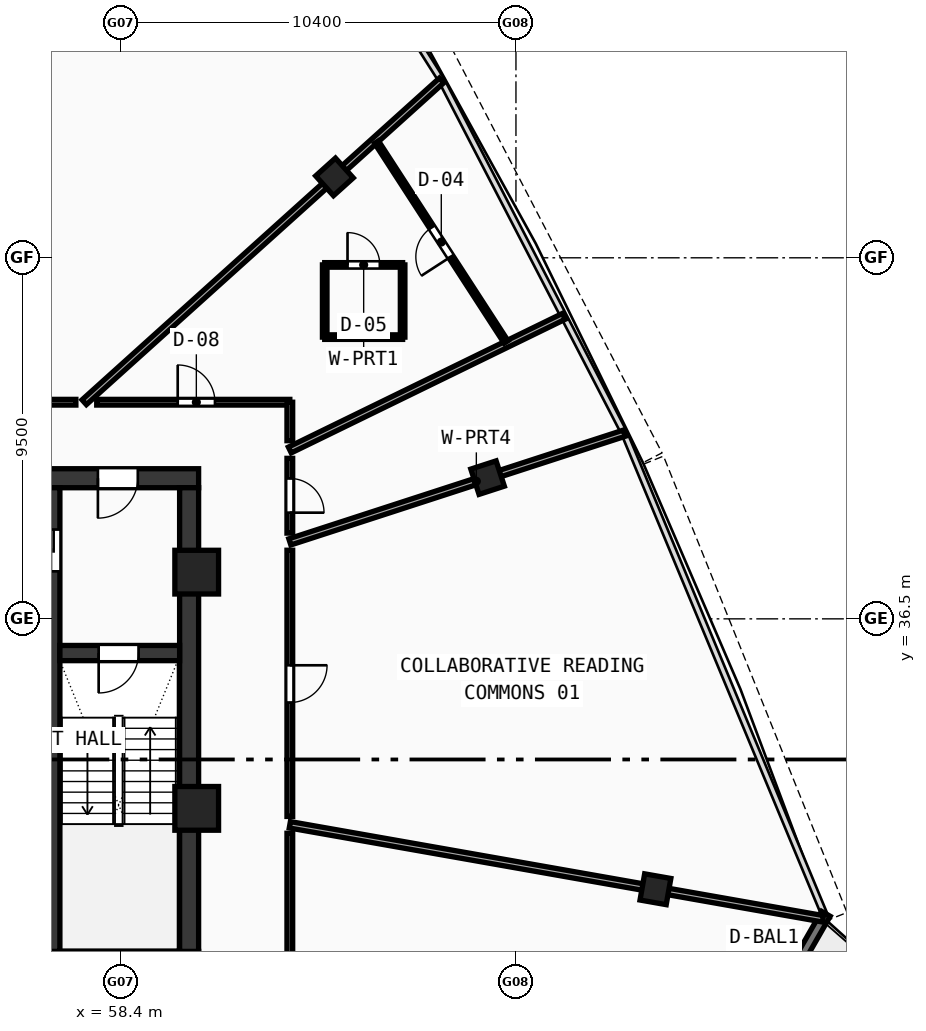
"""IFC4 building model, lengths in metres.
Left out: names, types, materials, properties, quantities, classifications, styles, units other than length and angle.
Written with IfcOpenShell. Run it as: python <this file> out.ifc"""

import sys

from ifc_helpers import new_model, si_unit, direction, frame, frame_2d, origin, origin_with_axes, origin_2d, place, context, subcontext, project, spatial, rectangle, hollow_rectangle, extrude, source, transform, mapped, element, fill, save


model = new_model("IFC4")
c1 = context("Model", 3, precision=1e-05, world=origin(), true_north=direction((0.0, 1.0)))
c2 = subcontext(c1, "Body", "Model", "MODEL_VIEW")
j1 = project(units=[si_unit("LENGTHUNIT", "METRE"), si_unit("PLANEANGLEUNIT", "RADIAN")], contexts=[c1])
p1 = place(None, origin())
s1 = spatial("IfcSite", under=j1, at=p1, CompositionType="ELEMENT")
p2 = place(p1, origin())
s2 = spatial("IfcBuilding", under=s1, at=p2, CompositionType="ELEMENT")
p3 = place(p2, frame((0.0, 0.0, 325.51)))
s3 = spatial("IfcBuildingStorey", under=s2, at=p3, CompositionType="ELEMENT", Elevation=325.51)
p4 = place(p3, frame((35.55, 27.5, 0.0), z_axis=(0.0, 0.0, 1.0), x_axis=(1.0, 0.0, 0.0)))
e1 = element("IfcWall", 1, at=p4, inside=s3, PredefinedType="SHEAR", context=c2, shape_type="SweptSolid", body=[
    extrude(rectangle(XDim=24.9, YDim=0.5, at=frame_2d((12.45, 0.0))), origin(), (0.0, 0.0, 1.0), 3.49),
])
p5 = place(p3, frame((49.2, 40.2, 0.0), z_axis=(0.0, 0.0, 1.0), x_axis=(1.0, 0.0, 0.0)))
e2 = element("IfcWall", 2, at=p5, inside=s3, PredefinedType="SHEAR", context=c2, shape_type="SweptSolid", body=[
    extrude(rectangle(XDim=11.25, YDim=0.5, at=frame_2d((5.625, 0.0))), origin(), (0.0, 0.0, 1.0), 3.49),
])
p6 = place(p5, frame((8.6, 0.0, 0.0)))
e3 = element("IfcOpeningElement", 3, at=p6, cuts=e2, PredefinedType="OPENING", context=c2, shape_type="SweptSolid", body=[
    extrude(rectangle(XDim=1.05, YDim=2.1, at=frame_2d((0.525, 1.05))), frame((0.0, 0.26, 0.0), z_axis=(0.0, -1.0, 0.0), x_axis=(1.0, 0.0, 0.0)), (0.0, 0.0, 1.0), 0.52),
])
p7 = place(p3, frame((60.2, 27.75, 0.0), z_axis=(0.0, 0.0, 1.0), x_axis=(0.0, 1.0, 0.0)))
e4 = element("IfcWall", 4, at=p7, inside=s3, PredefinedType="SHEAR", context=c2, shape_type="SweptSolid", body=[
    extrude(rectangle(XDim=12.2, YDim=0.5, at=frame_2d((6.1, 0.0))), origin(), (0.0, 0.0, 1.0), 3.49),
])
p8 = place(p3, frame((56.6, 27.75, 0.0), z_axis=(0.0, 0.0, 1.0), x_axis=(0.0, 1.0, 0.0)))
e5 = element("IfcWall", 5, at=p8, inside=s3, PredefinedType="SHEAR", context=c2, shape_type="SweptSolid", body=[
    extrude(rectangle(XDim=12.2, YDim=0.4, at=frame_2d((6.1, 0.0))), origin(), (0.0, 0.0, 1.0), 3.49),
])
p9 = place(p8, frame((10.0, 0.0, 0.0)))
e6 = element("IfcOpeningElement", 6, at=p9, cuts=e5, PredefinedType="OPENING", context=c2, shape_type="SweptSolid", body=[
    extrude(rectangle(XDim=1.1, YDim=2.1, at=frame_2d((0.55, 1.05))), frame((0.0, 0.21, 0.0), z_axis=(0.0, -1.0, 0.0), x_axis=(1.0, 0.0, 0.0)), (0.0, 0.0, 1.0), 0.42),
])
p10 = place(p3, frame((56.8, 35.6, 0.0), z_axis=(0.0, 0.0, 1.0), x_axis=(1.0, 0.0, 0.0)))
e7 = element("IfcWall", 7, at=p10, inside=s3, PredefinedType="SHEAR", context=c2, shape_type="SweptSolid", body=[
    extrude(rectangle(XDim=3.15, YDim=0.4, at=frame_2d((1.575, 0.0))), origin(), (0.0, 0.0, 1.0), 3.49),
])
p11 = place(p10, frame((1.02, 0.0, 0.0)))
e8 = element("IfcOpeningElement", 8, at=p11, cuts=e7, PredefinedType="OPENING", context=c2, shape_type="SweptSolid", body=[
    extrude(rectangle(XDim=1.05, YDim=2.1, at=frame_2d((0.525, 1.05))), frame((0.0, 0.21, 0.0), z_axis=(0.0, -1.0, 0.0), x_axis=(1.0, 0.0, 0.0)), (0.0, 0.0, 1.0), 0.42),
])
m1 = source(origin(), c2, "Body", "SweptSolid", [
    extrude(hollow_rectangle(XDim=1.15, YDim=1.15, WallThickness=0.048, at=origin_2d()), origin(), (0.0, 0.0, 1.0), 3.75),
])
for number, where, z_axis, x_axis in (
    (9, (60.4, 31.513, -0.26), (0.0, 0.0, 1.0), (1.0, 0.0, 0.0)),
    (10, (60.4, 37.729, -0.26), (0.0, 0.0, 1.0), (1.0, 0.0, 0.0)),
):
    element("IfcColumn", number, at=place(p3, frame(where, z_axis=z_axis, x_axis=x_axis)), inside=s3, PredefinedType="COLUMN", context=c2, shape_type="MappedRepresentation", body=[
        mapped(m1, transform((0.0, 0.0, 0.0), scale=1.0)),
    ])
m2 = source(origin(), c2, "Body", "SweptSolid", [
    extrude(hollow_rectangle(XDim=0.7, YDim=0.7, WallThickness=0.026, at=origin_2d()), origin(), (0.0, 0.0, 1.0), 3.75),
])
for number, where, z_axis, x_axis in (
    (11, (72.47, 29.385, -0.26), (0.0, 0.0, 1.0), (0.174, 0.985, 0.0)),
    (12, (68.053, 40.216, -0.26), (0.0, 0.0, 1.0), (-0.309, 0.951, 0.0)),
    (13, (64.025, 48.129, -0.26), (0.0, 0.0, 1.0), (-0.669, 0.743, 0.0)),
):
    element("IfcColumn", number, at=place(p3, frame(where, z_axis=z_axis, x_axis=x_axis)), inside=s3, PredefinedType="COLUMN", context=c2, shape_type="MappedRepresentation", body=[
        mapped(m2, transform((0.0, 0.0, 0.0), scale=1.0)),
    ])
p12 = place(p3, frame((73.712, 23.091, 0.0), z_axis=(0.0, 0.0, 1.0), x_axis=(0.49793434898, 0.867214727796, 0.0)))
e14 = element("IfcWall", 14, at=p12, inside=s3, PredefinedType="STANDARD", context=c2, shape_type="SweptSolid", body=[
    extrude(rectangle(XDim=6.513, YDim=0.26, at=frame_2d((3.256, 0.0))), origin(), (0.0, 0.0, 1.0), 3.49),
])
p13 = place(p12, frame((2.356, 0.0, 0.0)))
e15 = element("IfcOpeningElement", 15, at=p13, cuts=e14, PredefinedType="OPENING", context=c2, shape_type="SweptSolid", body=[
    extrude(rectangle(XDim=1.8, YDim=2.15, at=frame_2d((0.9, 1.075))), frame((0.0, 0.14, 0.0), z_axis=(0.0, -1.0, 0.0), x_axis=(1.0, 0.0, 0.0)), (0.0, 0.0, 1.0), 0.28),
])
p14 = place(p3, frame((62.85, 38.525, 0.0), z_axis=(0.0, 0.0, 1.0), x_axis=(0.951054035025, 0.309024630836, 0.0)))
e16 = element("IfcWall", 16, at=p14, inside=s3, PredefinedType="PARTITIONING", context=c2, shape_type="SweptSolid", body=[
    extrude(rectangle(XDim=9.254, YDim=0.17, at=frame_2d((4.627, 0.0))), origin(), (0.0, 0.0, 1.0), 2.89),
])
p15 = place(p3, frame((62.85, 40.943, 0.0), z_axis=(0.0, 0.0, 1.0), x_axis=(0.898797111691, 0.438364861749, 0.0)))
e17 = element("IfcWall", 17, at=p15, inside=s3, PredefinedType="PARTITIONING", context=c2, shape_type="SweptSolid", body=[
    extrude(rectangle(XDim=8.021, YDim=0.17, at=frame_2d((4.01, 0.0))), origin(), (0.0, 0.0, 1.0), 2.89),
])
p16 = place(p3, frame((57.44, 42.2, 0.0), z_axis=(0.0, 0.0, 1.0), x_axis=(0.743143506998, 0.669132070675, 0.0)))
e18 = element("IfcWall", 18, at=p16, inside=s3, PredefinedType="PARTITIONING", context=c2, shape_type="SweptSolid", body=[
    extrude(rectangle(XDim=12.654, YDim=0.17, at=frame_2d((6.327, 0.0))), origin(), (0.0, 0.0, 1.0), 2.89),
])
p17 = place(p3, frame((62.85, 31.082, 0.0), z_axis=(0.0, 0.0, 1.0), x_axis=(0.984807879062, -0.173647462802, 0.0)))
e19 = element("IfcWall", 19, at=p17, inside=s3, PredefinedType="PARTITIONING", context=c2, shape_type="SweptSolid", body=[
    extrude(rectangle(XDim=14.244, YDim=0.17, at=frame_2d((7.122, 0.0))), origin(), (0.0, 0.0, 1.0), 2.89),
])
p18 = place(p3, frame((54.02, 42.2, 0.0), z_axis=(0.0, 0.0, 1.0), x_axis=(1.0, 0.0, 0.0)))
e20 = element("IfcWall", 20, at=p18, inside=s3, PredefinedType="PARTITIONING", context=c2, shape_type="SweptSolid", body=[
    extrude(rectangle(XDim=3.2, YDim=0.15, at=frame_2d((1.6, 0.0))), origin(), (0.0, 0.0, 1.0), 2.89),
])
p19 = place(p3, frame((57.769, 42.2, 0.0), z_axis=(0.0, 0.0, 1.0), x_axis=(1.0, 0.0, 0.0)))
e21 = element("IfcWall", 21, at=p19, inside=s3, PredefinedType="PARTITIONING", context=c2, shape_type="SweptSolid", body=[
    extrude(rectangle(XDim=5.081, YDim=0.15, at=frame_2d((2.541, 0.0))), origin(), (0.0, 0.0, 1.0), 3.14),
])
p20 = place(p19, frame((2.131, 0.0, 0.0)))
e22 = element("IfcOpeningElement", 22, at=p20, cuts=e21, PredefinedType="OPENING", context=c2, shape_type="SweptSolid", body=[
    extrude(rectangle(XDim=0.98, YDim=2.12, at=frame_2d((0.49, 1.06))), frame((0.0, 0.085, 0.0), z_axis=(0.0, -1.0, 0.0), x_axis=(1.0, 0.0, 0.0)), (0.0, 0.0, 1.0), 0.17),
])
p21 = place(p3, frame((62.85, 42.2, 0.0), z_axis=(0.0, 0.0, 1.0), x_axis=(0.0, -1.0, 0.0)))
e23 = element("IfcWall", 23, at=p21, inside=s3, PredefinedType="PARTITIONING", context=c2, shape_type="SweptSolid", body=[
    extrude(rectangle(XDim=1.012, YDim=0.15, at=frame_2d((0.506, 0.0))), origin(), (0.0, 0.0, 1.0), 3.49),
])
p22 = place(p3, frame((62.85, 40.723, 0.0), z_axis=(0.0, 0.0, 1.0), x_axis=(0.0, -1.0, 0.0)))
e24 = element("IfcWall", 24, at=p22, inside=s3, PredefinedType="PARTITIONING", context=c2, shape_type="SweptSolid", body=[
    extrude(rectangle(XDim=1.967, YDim=0.15, at=frame_2d((0.983, 0.0))), origin(), (0.0, 0.0, 1.0), 3.14),
])
p23 = place(p22, frame((0.529, 0.0, 0.0)))
e25 = element("IfcOpeningElement", 25, at=p23, cuts=e24, PredefinedType="OPENING", context=c2, shape_type="SweptSolid", body=[
    extrude(rectangle(XDim=0.9, YDim=2.08, at=frame_2d((0.45, 1.04))), frame((0.0, 0.085, 0.0), z_axis=(0.0, -1.0, 0.0), x_axis=(1.0, 0.0, 0.0)), (0.0, 0.0, 1.0), 0.17),
])
p24 = place(p3, frame((62.85, 38.305, 0.0), z_axis=(0.0, 0.0, 1.0), x_axis=(0.0, -1.0, 0.0)))
e26 = element("IfcWall", 26, at=p24, inside=s3, PredefinedType="PARTITIONING", context=c2, shape_type="SweptSolid", body=[
    extrude(rectangle(XDim=7.004, YDim=0.15, at=frame_2d((3.502, 0.0))), origin(), (0.0, 0.0, 1.0), 3.49),
])
p25 = place(p24, frame((3.027, 0.0, 0.0)))
e27 = element("IfcOpeningElement", 27, at=p25, cuts=e26, PredefinedType="OPENING", context=c2, shape_type="SweptSolid", body=[
    extrude(rectangle(XDim=0.98, YDim=2.12, at=frame_2d((0.49, 1.06))), frame((0.0, 0.085, 0.0), z_axis=(0.0, -1.0, 0.0), x_axis=(1.0, 0.0, 0.0)), (0.0, 0.0, 1.0), 0.17),
])
p26 = place(p3, frame((62.85, 30.858, 0.0), z_axis=(0.0, 0.0, 1.0), x_axis=(0.0, -1.0, 0.0)))
e28 = element("IfcWall", 28, at=p26, inside=s3, PredefinedType="PARTITIONING", context=c2, shape_type="SweptSolid", body=[
    extrude(rectangle(XDim=5.958, YDim=0.15, at=frame_2d((2.979, 0.0))), origin(), (0.0, 0.0, 1.0), 2.89),
])
p27 = place(p3, frame((63.768, 43.913, 0.0), z_axis=(0.0, 0.0, 1.0), x_axis=(1.0, 0.0, 0.0)))
e29 = element("IfcWall", 29, at=p27, inside=s3, PredefinedType="PARTITIONING", context=c2, shape_type="SweptSolid", body=[
    extrude(rectangle(XDim=2.05, YDim=0.12, at=frame_2d((1.025, 0.0))), origin(), (0.0, 0.0, 1.0), 3.49),
])
p28 = place(p3, frame((65.818, 43.913, 0.0), z_axis=(0.0, 0.0, 1.0), x_axis=(0.0, 1.0, 0.0)))
e30 = element("IfcWall", 30, at=p28, inside=s3, PredefinedType="PARTITIONING", context=c2, shape_type="SweptSolid", body=[
    extrude(rectangle(XDim=1.9, YDim=0.12, at=frame_2d((0.95, 0.0))), origin(), (0.0, 0.0, 1.0), 2.89),
])
p29 = place(p3, frame((65.818, 45.813, 0.0), z_axis=(0.0, 0.0, 1.0), x_axis=(-1.0, 0.0, 0.0)))
e31 = element("IfcWall", 31, at=p29, inside=s3, PredefinedType="PARTITIONING", context=c2, shape_type="SweptSolid", body=[
    extrude(rectangle(XDim=2.05, YDim=0.12, at=frame_2d((1.025, 0.0))), origin(), (0.0, 0.0, 1.0), 2.89),
])
p30 = place(p29, frame((0.6, 0.0, 0.0)))
e32 = element("IfcOpeningElement", 32, at=p30, cuts=e31, PredefinedType="OPENING", context=c2, shape_type="SweptSolid", body=[
    extrude(rectangle(XDim=0.85, YDim=2.1, at=frame_2d((0.425, 1.05))), frame((0.0, 0.07, 0.0), z_axis=(0.0, -1.0, 0.0), x_axis=(1.0, 0.0, 0.0)), (0.0, 0.0, 1.0), 0.14),
])
p31 = place(p3, frame((63.768, 45.813, 0.0), z_axis=(0.0, 0.0, 1.0), x_axis=(0.0, -1.0, 0.0)))
e33 = element("IfcWall", 33, at=p31, inside=s3, PredefinedType="PARTITIONING", context=c2, shape_type="SweptSolid", body=[
    extrude(rectangle(XDim=1.9, YDim=0.12, at=frame_2d((0.95, 0.0))), origin(), (0.0, 0.0, 1.0), 3.49),
])
p32 = place(p3, frame((68.54, 43.785, 0.0), z_axis=(0.0, 0.0, 1.0), x_axis=(-0.54386649996, 0.839171752516, 0.0)))
e34 = element("IfcWall", 34, at=p32, inside=s3, PredefinedType="PARTITIONING", context=c2, shape_type="SweptSolid", body=[
    extrude(rectangle(XDim=6.268, YDim=0.12, at=frame_2d((3.134, 0.0))), origin(), (0.0, 0.0, 1.0), 2.89),
])
p33 = place(p32, frame((2.674, 0.0, 0.0)))
e35 = element("IfcOpeningElement", 35, at=p33, cuts=e34, PredefinedType="OPENING", context=c2, shape_type="SweptSolid", body=[
    extrude(rectangle(XDim=0.92, YDim=2.1, at=frame_2d((0.46, 1.05))), frame((0.0, 0.07, 0.0), z_axis=(0.0, -1.0, 0.0), x_axis=(1.0, 0.0, 0.0)), (0.0, 0.0, 1.0), 0.14),
])
m3 = source(origin(), c2, "Body", "SweptSolid", [
    extrude(rectangle(XDim=1.05, YDim=2.1, at=frame_2d((0.525, 1.05))), frame((0.0, 0.025, 0.0), z_axis=(0.0, -1.0, 0.0), x_axis=(1.0, 0.0, 0.0)), (0.0, 0.0, 1.0), 0.05),
])
p34 = place(p11, frame((1.05, 0.0, 0.0), z_axis=(0.0, 0.0, 1.0), x_axis=(-1.0, 0.0, 0.0)))
e36 = element("IfcDoor", 36, at=p34, inside=s3, OperationType="SINGLE_SWING_RIGHT", PredefinedType="DOOR", context=c2, shape_type="MappedRepresentation", body=[
    mapped(m3, transform((0.0, 0.0, 0.0), scale=1.0)),
])
fill(e8, e36)
p35 = place(p6, frame((1.05, 0.0, 0.0), z_axis=(0.0, 0.0, 1.0), x_axis=(-1.0, 0.0, 0.0)))
e37 = element("IfcDoor", 37, at=p35, inside=s3, OperationType="SINGLE_SWING_RIGHT", PredefinedType="DOOR", context=c2, shape_type="MappedRepresentation", body=[
    mapped(m3, transform((0.0, 0.0, 0.0), scale=1.0)),
])
fill(e3, e37)
m4 = source(origin(), c2, "Body", "SweptSolid", [
    extrude(rectangle(XDim=1.1, YDim=2.1, at=frame_2d((0.55, 1.05))), frame((0.0, 0.025, 0.0), z_axis=(0.0, -1.0, 0.0), x_axis=(1.0, 0.0, 0.0)), (0.0, 0.0, 1.0), 0.05),
])
p36 = place(p9, origin_with_axes())
e38 = element("IfcDoor", 38, at=p36, inside=s3, OperationType="DOUBLE_DOOR_SLIDING", PredefinedType="DOOR", context=c2, shape_type="MappedRepresentation", body=[
    mapped(m4, transform((0.0, 0.0, 0.0), scale=1.0)),
])
fill(e6, e38)
m5 = source(origin(), c2, "Body", "SweptSolid", [
    extrude(rectangle(XDim=0.98, YDim=2.12, at=frame_2d((0.49, 1.06))), frame((0.0, 0.025, 0.0), z_axis=(0.0, -1.0, 0.0), x_axis=(1.0, 0.0, 0.0)), (0.0, 0.0, 1.0), 0.05),
])
p37 = place(p25, origin_with_axes())
e39 = element("IfcDoor", 39, at=p37, inside=s3, OperationType="SINGLE_SWING_LEFT", PredefinedType="DOOR", context=c2, shape_type="MappedRepresentation", body=[
    mapped(m5, transform((0.0, 0.0, 0.0), scale=1.0)),
])
fill(e27, e39)
m6 = source(origin(), c2, "Body", "SweptSolid", [
    extrude(rectangle(XDim=0.9, YDim=2.08, at=frame_2d((0.45, 1.04))), frame((0.0, 0.025, 0.0), z_axis=(0.0, -1.0, 0.0), x_axis=(1.0, 0.0, 0.0)), (0.0, 0.0, 1.0), 0.05),
])
p38 = place(p23, origin_with_axes())
e40 = element("IfcDoor", 40, at=p38, inside=s3, OperationType="SINGLE_SWING_RIGHT", PredefinedType="DOOR", context=c2, shape_type="MappedRepresentation", body=[
    mapped(m6, transform((0.0, 0.0, 0.0), scale=1.0)),
])
fill(e25, e40)
p39 = place(p20, origin_with_axes())
e41 = element("IfcDoor", 41, at=p39, inside=s3, OperationType="SINGLE_SWING_LEFT", PredefinedType="DOOR", context=c2, shape_type="MappedRepresentation", body=[
    mapped(m5, transform((0.0, 0.0, 0.0), scale=1.0)),
])
fill(e22, e41)
m7 = source(origin(), c2, "Body", "SweptSolid", [
    extrude(rectangle(XDim=0.85, YDim=2.1, at=frame_2d((0.425, 1.05))), frame((0.0, 0.025, 0.0), z_axis=(0.0, -1.0, 0.0), x_axis=(1.0, 0.0, 0.0)), (0.0, 0.0, 1.0), 0.05),
])
p40 = place(p30, frame((0.85, 0.0, 0.0), z_axis=(0.0, 0.0, 1.0), x_axis=(-1.0, 0.0, 0.0)))
e42 = element("IfcDoor", 42, at=p40, inside=s3, OperationType="SINGLE_SWING_LEFT", PredefinedType="DOOR", context=c2, shape_type="MappedRepresentation", body=[
    mapped(m7, transform((0.0, 0.0, 0.0), scale=1.0)),
])
fill(e32, e42)
m8 = source(origin(), c2, "Body", "SweptSolid", [
    extrude(rectangle(XDim=0.92, YDim=2.1, at=frame_2d((0.46, 1.05))), frame((0.0, 0.025, 0.0), z_axis=(0.0, -1.0, 0.0), x_axis=(1.0, 0.0, 0.0)), (0.0, 0.0, 1.0), 0.05),
])
p41 = place(p33, origin_with_axes())
e43 = element("IfcDoor", 43, at=p41, inside=s3, OperationType="SINGLE_SWING_LEFT", PredefinedType="DOOR", context=c2, shape_type="MappedRepresentation", body=[
    mapped(m8, transform((0.0, 0.0, 0.0), scale=1.0)),
])
fill(e35, e43)
save(model, sys.argv[1])
